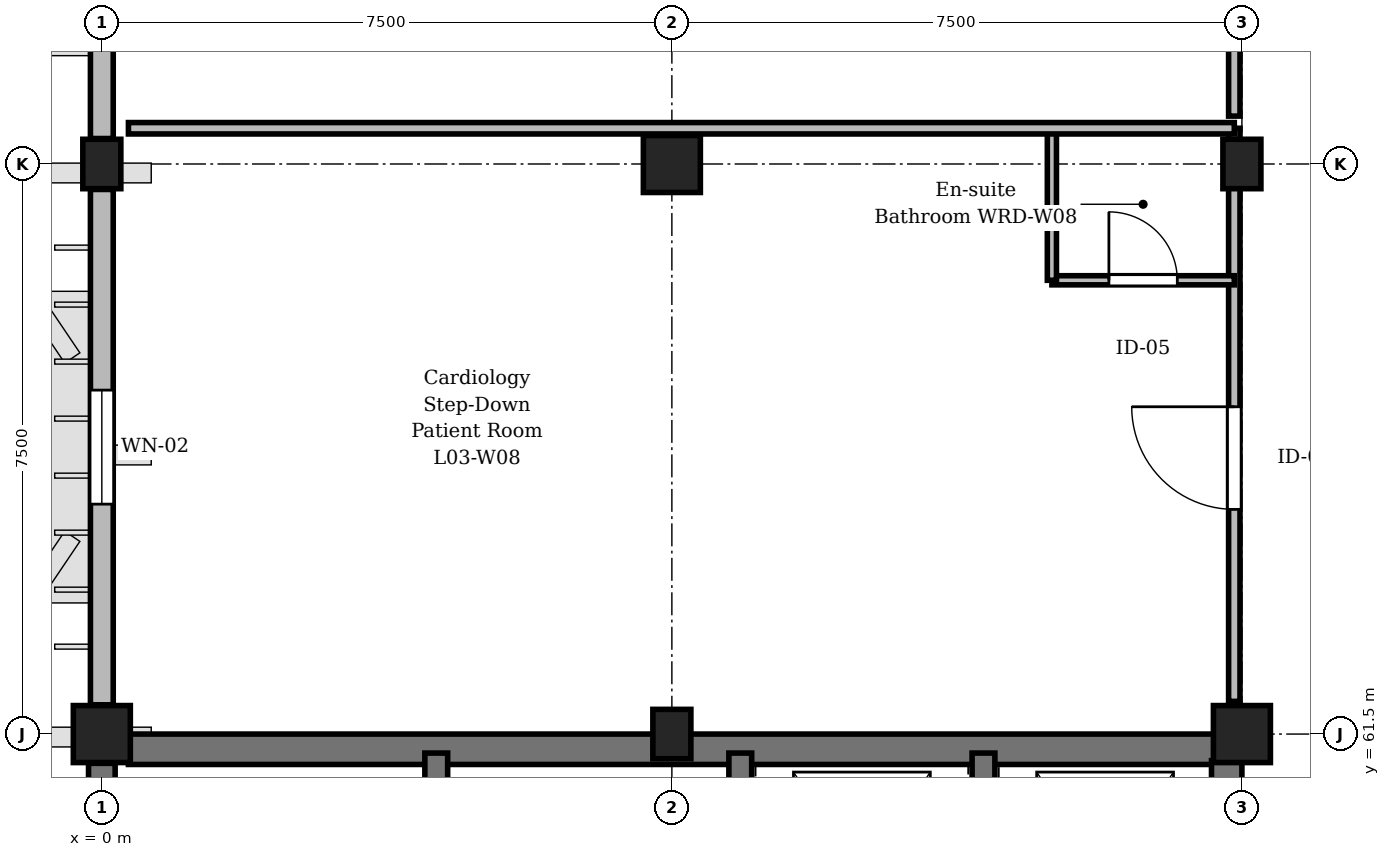
"""IFC4 building model, lengths in metres.
Left out: names, types, materials, properties, quantities, classifications, styles, units other than length and angle.
Written with IfcOpenShell. Run it as: python <this file> out.ifc"""

import sys

from ifc_helpers import new_model, si_unit, direction, frame, frame_2d, origin, origin_2d, place, context, subcontext, project, spatial, rectangle, extrude, element, fill, save


model = new_model("IFC4")
c1 = context("Model", 3, precision=1e-05, world=origin(), true_north=direction((0.0, 1.0)))
c2 = subcontext(c1, "Body", "Model", "MODEL_VIEW")
j1 = project(units=[si_unit("LENGTHUNIT", "METRE"), si_unit("PLANEANGLEUNIT", "RADIAN")], contexts=[c1])
p1 = place(None, origin())
s1 = spatial("IfcSite", under=j1, at=p1, CompositionType="ELEMENT")
p2 = place(p1, origin())
s2 = spatial("IfcBuilding", under=s1, at=p2, CompositionType="ELEMENT")
p3 = place(p2, frame((0.0, 0.0, 14.1)))
s3 = spatial("IfcBuildingStorey", under=s2, at=p3, CompositionType="ELEMENT", Elevation=14.1)
p4 = place(p3, frame((0.0, 61.5, 0.0), z_axis=(0.0, 0.0, 1.0), x_axis=(1.0, 0.0, 0.0)))
e1 = element("IfcColumn", 1, at=p4, inside=s3, PredefinedType="COLUMN", context=c2, shape_type="SweptSolid", body=[
    extrude(rectangle(XDim=0.75, YDim=0.75, at=origin_2d()), origin(), (0.0, 0.0, 1.0), 3.75),
])
for number, where, z_axis, x_axis in (
    (2, (0.0, 69.0, 0.0), (0.0, 0.0, 1.0), (1.0, 0.0, 0.0)),
    (3, (7.5, 61.5, 0.0), (0.0, 0.0, 1.0), (1.0, 0.0, 0.0)),
):
    element("IfcColumn", number, at=place(p3, frame(where, z_axis=z_axis, x_axis=x_axis)), inside=s3, PredefinedType="COLUMN", context=c2, shape_type="SweptSolid", body=[
        extrude(rectangle(XDim=0.5, YDim=0.65, at=origin_2d()), origin(), (0.0, 0.0, 1.0), 3.75),
    ])
for number, where, z_axis, x_axis in (
    (4, (7.5, 69.0, 0.0), (0.0, 0.0, 1.0), (1.0, 0.0, 0.0)),
    (5, (15.0, 61.5, 0.0), (0.0, 0.0, 1.0), (1.0, 0.0, 0.0)),
):
    element("IfcColumn", number, at=place(p3, frame(where, z_axis=z_axis, x_axis=x_axis)), inside=s3, PredefinedType="COLUMN", context=c2, shape_type="SweptSolid", body=[
        extrude(rectangle(XDim=0.75, YDim=0.75, at=origin_2d()), origin(), (0.0, 0.0, 1.0), 3.75),
    ])
p5 = place(p3, frame((15.0, 69.0, 0.0), z_axis=(0.0, 0.0, 1.0), x_axis=(1.0, 0.0, 0.0)))
e6 = element("IfcColumn", 6, at=p5, inside=s3, PredefinedType="COLUMN", context=c2, shape_type="SweptSolid", body=[
    extrude(rectangle(XDim=0.5, YDim=0.65, at=origin_2d()), origin(), (0.0, 0.0, 1.0), 3.75),
])
p6 = place(p3, frame((0.0, 54.335, 0.0), z_axis=(0.0, 0.0, 1.0), x_axis=(0.0, 1.0, 0.0)))
e7 = element("IfcWall", 7, at=p6, inside=s3, PredefinedType="SHEAR", context=c2, shape_type="SweptSolid", body=[
    extrude(rectangle(XDim=6.78, YDim=0.35, at=frame_2d((3.39, 0.0))), origin(), (0.0, 0.0, 1.0), 3.47),
])
p7 = place(p3, frame((0.0, 61.885, 0.0), z_axis=(0.0, 0.0, 1.0), x_axis=(0.0, 1.0, 0.0)))
e8 = element("IfcWall", 8, at=p7, inside=s3, PredefinedType="STANDARD", context=c2, shape_type="SweptSolid", body=[
    extrude(rectangle(XDim=6.78, YDim=0.3, at=frame_2d((3.39, 0.0))), origin(), (0.0, 0.0, 1.0), 2.87),
])
p8 = place(p7, frame((2.64, 0.0, 0.9)))
e9 = element("IfcOpeningElement", 9, at=p8, cuts=e8, PredefinedType="OPENING", context=c2, shape_type="SweptSolid", body=[
    extrude(rectangle(XDim=1.5, YDim=1.69, at=frame_2d((0.75, 0.845))), frame((0.0, 0.16, 0.0), z_axis=(0.0, -1.0, 0.0), x_axis=(1.0, 0.0, 0.0)), (0.0, 0.0, 1.0), 0.32),
])
p9 = place(p3, frame((0.0, 69.335, 0.0), z_axis=(0.0, 0.0, 1.0), x_axis=(0.0, 1.0, 0.0)))
e10 = element("IfcWall", 10, at=p9, inside=s3, PredefinedType="STANDARD", context=c2, shape_type="SweptSolid", body=[
    extrude(rectangle(XDim=6.78, YDim=0.3, at=frame_2d((3.39, 0.0))), origin(), (0.0, 0.0, 1.0), 2.87),
])
p10 = place(p9, frame((2.34, 0.0, 0.9)))
e11 = element("IfcOpeningElement", 11, at=p10, cuts=e10, PredefinedType="OPENING", context=c2, shape_type="SweptSolid", body=[
    extrude(rectangle(XDim=2.1, YDim=1.69, at=frame_2d((1.05, 0.845))), frame((0.0, 0.16, 0.0), z_axis=(0.0, -1.0, 0.0), x_axis=(1.0, 0.0, 0.0)), (0.0, 0.0, 1.0), 0.32),
])
p11 = place(p3, frame((0.35, 61.3, 0.0), z_axis=(0.0, 0.0, 1.0), x_axis=(1.0, 0.0, 0.0)))
e12 = element("IfcWall", 12, at=p11, inside=s3, PredefinedType="SHEAR", context=c2, shape_type="SweptSolid", body=[
    extrude(rectangle(XDim=14.3, YDim=0.4, at=frame_2d((7.15, 0.0))), origin(), (0.0, 0.0, 1.0), 3.47),
])
p12 = place(p3, frame((14.8, 58.1, 0.0), z_axis=(0.0, 0.0, 1.0), x_axis=(0.0, 1.0, 0.0)))
e13 = element("IfcWall", 13, at=p12, inside=s3, PredefinedType="SHEAR", context=c2, shape_type="SweptSolid", body=[
    extrude(rectangle(XDim=3.05, YDim=0.4, at=frame_2d((1.525, 0.0))), origin(), (0.0, 0.0, 1.0), 3.47),
])
for number, where, z_axis, x_axis in (
    (14, (4.4, 58.1, 0.0), (0.0, 0.0, 1.0), (0.0, 1.0, 0.0)),
    (15, (8.4, 58.1, 0.0), (0.0, 0.0, 1.0), (0.0, 1.0, 0.0)),
    (16, (11.6, 58.1, 0.0), (0.0, 0.0, 1.0), (0.0, 1.0, 0.0)),
):
    element("IfcWall", number, at=place(p3, frame(where, z_axis=z_axis, x_axis=x_axis)), inside=s3, PredefinedType="SHEAR", context=c2, shape_type="SweptSolid", body=[
        extrude(rectangle(XDim=3.15, YDim=0.3, at=frame_2d((1.575, 0.0))), origin(), (0.0, 0.0, 1.0), 3.47),
    ])
p13 = place(p3, frame((14.9, 61.93, 0.0), z_axis=(0.0, 0.0, 1.0), x_axis=(0.0, 1.0, 0.0)))
e17 = element("IfcWall", 17, at=p13, inside=s3, PredefinedType="PARTITIONING", context=c2, shape_type="SweptSolid", body=[
    extrude(rectangle(XDim=7.54, YDim=0.15, at=frame_2d((3.77, 0.0))), origin(), (0.0, 0.0, 1.0), 2.905),
])
p14 = place(p13, frame((2.526, 0.0, 0.0)))
e18 = element("IfcOpeningElement", 18, at=p14, cuts=e17, PredefinedType="OPENING", context=c2, shape_type="SweptSolid", body=[
    extrude(rectangle(XDim=1.35, YDim=2.25, at=frame_2d((0.675, 1.125))), frame((0.0, 0.085, 0.0), z_axis=(0.0, -1.0, 0.0), x_axis=(1.0, 0.0, 0.0)), (0.0, 0.0, 1.0), 0.17),
])
p15 = place(p3, frame((12.5, 67.47, 0.0), z_axis=(0.0, 0.0, 1.0), x_axis=(1.0, 0.0, 0.0)))
e19 = element("IfcWall", 19, at=p15, inside=s3, PredefinedType="PARTITIONING", context=c2, shape_type="SweptSolid", body=[
    extrude(rectangle(XDim=2.4, YDim=0.12, at=frame_2d((1.2, 0.0))), origin(), (0.0, 0.0, 1.0), 3.455),
])
p16 = place(p15, frame((0.75, 0.0, 0.0)))
e20 = element("IfcOpeningElement", 20, at=p16, cuts=e19, PredefinedType="OPENING", context=c2, shape_type="SweptSolid", body=[
    extrude(rectangle(XDim=0.9, YDim=2.1, at=frame_2d((0.45, 1.05))), frame((0.0, 0.07, 0.0), z_axis=(0.0, -1.0, 0.0), x_axis=(1.0, 0.0, 0.0)), (0.0, 0.0, 1.0), 0.14),
])
p17 = place(p3, frame((12.5, 67.47, 0.0), z_axis=(0.0, 0.0, 1.0), x_axis=(0.0, 1.0, 0.0)))
e21 = element("IfcWall", 21, at=p17, inside=s3, PredefinedType="PARTITIONING", context=c2, shape_type="SweptSolid", body=[
    extrude(rectangle(XDim=2.0, YDim=0.12, at=frame_2d((1.0, 0.0))), origin(), (0.0, 0.0, 1.0), 3.455),
])
p18 = place(p3, frame((14.9, 69.63, 0.0), z_axis=(0.0, 0.0, 1.0), x_axis=(0.0, 1.0, 0.0)))
e22 = element("IfcWall", 22, at=p18, inside=s3, PredefinedType="PARTITIONING", context=c2, shape_type="SweptSolid", body=[
    extrude(rectangle(XDim=7.54, YDim=0.15, at=frame_2d((3.77, 0.0))), origin(), (0.0, 0.0, 1.0), 2.755),
])
p19 = place(p18, frame((2.526, 0.0, 0.0)))
e23 = element("IfcOpeningElement", 23, at=p19, cuts=e22, PredefinedType="OPENING", context=c2, shape_type="SweptSolid", body=[
    extrude(rectangle(XDim=1.35, YDim=2.25, at=frame_2d((0.675, 1.125))), frame((0.0, 0.085, 0.0), z_axis=(0.0, -1.0, 0.0), x_axis=(1.0, 0.0, 0.0)), (0.0, 0.0, 1.0), 0.17),
])
p20 = place(p3, frame((0.35, 69.47, 0.0), z_axis=(0.0, 0.0, 1.0), x_axis=(1.0, 0.0, 0.0)))
e24 = element("IfcWall", 24, at=p20, inside=s3, PredefinedType="PARTITIONING", context=c2, shape_type="SweptSolid", body=[
    extrude(rectangle(XDim=14.55, YDim=0.15, at=frame_2d((7.275, 0.0))), origin(), (0.0, 0.0, 1.0), 3.455),
])
p21 = place(p8, origin())
e25 = element("IfcWindow", 25, at=p21, inside=s3, PartitioningType="SINGLE_PANEL", PredefinedType="WINDOW", context=c2, shape_type="SweptSolid", body=[
    extrude(rectangle(XDim=1.5, YDim=1.69, at=frame_2d((0.75, 0.845))), frame((0.0, 0.03, 0.0), z_axis=(0.0, -1.0, 0.0), x_axis=(1.0, 0.0, 0.0)), (0.0, 0.0, 1.0), 0.06),
])
fill(e9, e25)
p22 = place(p14, origin())
e26 = element("IfcDoor", 26, at=p22, inside=s3, OperationType="SINGLE_SWING_RIGHT", PredefinedType="DOOR", context=c2, shape_type="SweptSolid", body=[
    extrude(rectangle(XDim=1.35, YDim=2.25, at=frame_2d((0.675, 1.125))), frame((0.0, 0.025, 0.0), z_axis=(0.0, -1.0, 0.0), x_axis=(1.0, 0.0, 0.0)), (0.0, 0.0, 1.0), 0.05),
])
fill(e18, e26)
p23 = place(p16, origin())
e27 = element("IfcDoor", 27, at=p23, inside=s3, OperationType="SINGLE_SWING_LEFT", PredefinedType="DOOR", context=c2, shape_type="SweptSolid", body=[
    extrude(rectangle(XDim=0.9, YDim=2.1, at=frame_2d((0.45, 1.05))), frame((0.0, 0.025, 0.0), z_axis=(0.0, -1.0, 0.0), x_axis=(1.0, 0.0, 0.0)), (0.0, 0.0, 1.0), 0.05),
])
fill(e20, e27)
save(model, sys.argv[1])
